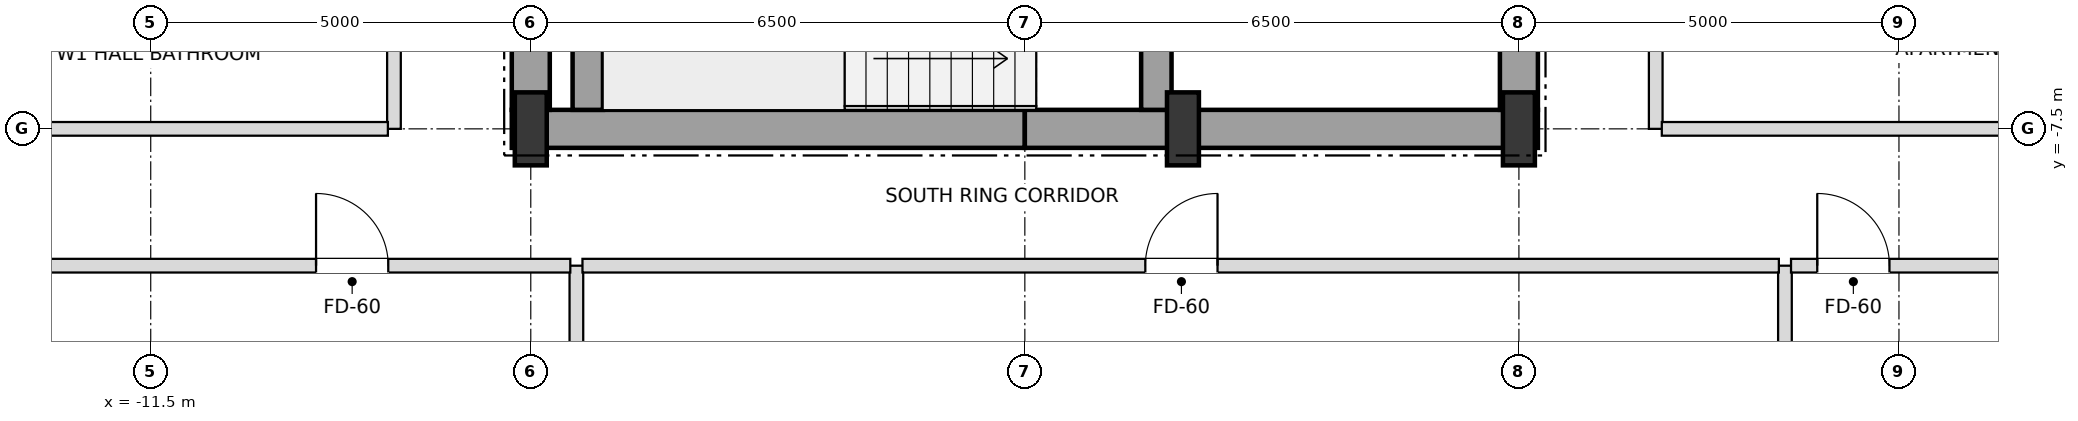
"""IFC4 building model, lengths in metres.
Left out: names, types, materials, properties, quantities, classifications, styles, units other than length and angle.
Written with IfcOpenShell. Run it as: python <this file> out.ifc"""

import sys

from ifc_helpers import new_model, si_unit, direction, frame, frame_2d, origin, origin_2d, place, context, subcontext, project, spatial, rectangle, i_section, extrude, element, fill, save


model = new_model("IFC4")
c1 = context("Model", 3, precision=1e-05, world=origin(), true_north=direction((0.0, 1.0)))
c2 = subcontext(c1, "Body", "Model", "MODEL_VIEW")
j1 = project(units=[si_unit("LENGTHUNIT", "METRE"), si_unit("PLANEANGLEUNIT", "RADIAN")], contexts=[c1])
p1 = place(None, origin())
s1 = spatial("IfcSite", under=j1, at=p1, CompositionType="ELEMENT")
p2 = place(p1, origin())
s2 = spatial("IfcBuilding", under=s1, at=p2, CompositionType="ELEMENT")
p3 = place(p2, frame((0.0, 0.0, 64.8)))
s3 = spatial("IfcBuildingStorey", under=s2, at=p3, CompositionType="ELEMENT", Elevation=64.8)
for number, where, z_axis, x_axis in (
    (1, (-6.5, -7.5, 0.0), (0.0, 0.0, 1.0), (1.0, 0.0, 0.0)),
    (2, (2.08, -7.5, 0.0), (0.0, 0.0, 1.0), (1.0, 0.0, 0.0)),
    (3, (6.5, -7.5, 0.0), (0.0, 0.0, 1.0), (1.0, 0.0, 0.0)),
):
    element("IfcColumn", number, at=place(p3, frame(where, z_axis=z_axis, x_axis=x_axis)), inside=s3, PredefinedType="COLUMN", context=c2, shape_type="SweptSolid", body=[
        extrude(i_section(OverallWidth=0.42, OverallDepth=0.96, WebThickness=0.022, FlangeThickness=0.034, at=origin_2d()), origin(), (0.0, 0.0, 1.0), 3.6),
    ])
for number, where, z_axis, x_axis in (
    (4, (-6.75, -7.5, 0.0), (0.0, 0.0, 1.0), (1.0, 0.0, 0.0)),
    (5, (0.0, -7.5, 0.0), (0.0, 0.0, 1.0), (1.0, 0.0, 0.0)),
):
    element("IfcWall", number, at=place(p3, frame(where, z_axis=z_axis, x_axis=x_axis)), inside=s3, PredefinedType="SHEAR", context=c2, shape_type="SweptSolid", body=[
        extrude(rectangle(XDim=6.75, YDim=0.5, at=frame_2d((3.375, 0.0))), origin(), (0.0, 0.0, 1.0), 3.38),
    ])
p4 = place(p3, frame((-6.5, -7.25, 0.0), z_axis=(0.0, 0.0, 1.0), x_axis=(0.0, 1.0, 0.0)))
e6 = element("IfcWall", 6, at=p4, inside=s3, PredefinedType="SHEAR", context=c2, shape_type="SweptSolid", body=[
    extrude(rectangle(XDim=3.55, YDim=0.5, at=frame_2d((1.775, 0.0))), origin(), (0.0, 0.0, 1.0), 3.38),
])
p5 = place(p3, frame((6.5, -7.25, 0.0), z_axis=(0.0, 0.0, 1.0), x_axis=(0.0, 1.0, 0.0)))
e7 = element("IfcWall", 7, at=p5, inside=s3, PredefinedType="SHEAR", context=c2, shape_type="SweptSolid", body=[
    extrude(rectangle(XDim=5.75, YDim=0.5, at=frame_2d((2.875, 0.0))), origin(), (0.0, 0.0, 1.0), 3.38),
])
p6 = place(p5, frame((0.85, 0.0, 0.0)))
e8 = element("IfcOpeningElement", 8, at=p6, cuts=e7, PredefinedType="OPENING", context=c2, shape_type="SweptSolid", body=[
    extrude(rectangle(XDim=1.05, YDim=2.15, at=frame_2d((0.525, 1.075))), frame((0.0, 0.26, 0.0), z_axis=(0.0, -1.0, 0.0), x_axis=(1.0, 0.0, 0.0)), (0.0, 0.0, 1.0), 0.52),
])
p7 = place(p3, frame((-5.75, -7.25, 0.0), z_axis=(0.0, 0.0, 1.0), x_axis=(0.0, 1.0, 0.0)))
e9 = element("IfcWall", 9, at=p7, inside=s3, PredefinedType="SHEAR", context=c2, shape_type="SweptSolid", body=[
    extrude(rectangle(XDim=2.9, YDim=0.4, at=frame_2d((1.45, 0.0))), origin(), (0.0, 0.0, 1.0), 3.38),
])
p8 = place(p3, frame((1.73, -7.25, 0.0), z_axis=(0.0, 0.0, 1.0), x_axis=(0.0, 1.0, 0.0)))
e10 = element("IfcWall", 10, at=p8, inside=s3, PredefinedType="SHEAR", context=c2, shape_type="SweptSolid", body=[
    extrude(rectangle(XDim=3.3, YDim=0.4, at=frame_2d((1.65, 0.0))), origin(), (0.0, 0.0, 1.0), 3.38),
])
p9 = place(p8, frame((0.9, 0.0, 0.0)))
e11 = element("IfcOpeningElement", 11, at=p9, cuts=e10, PredefinedType="OPENING", context=c2, shape_type="SweptSolid", body=[
    extrude(rectangle(XDim=1.05, YDim=2.15, at=frame_2d((0.525, 1.075))), frame((0.0, 0.21, 0.0), z_axis=(0.0, -1.0, 0.0), x_axis=(1.0, 0.0, 0.0)), (0.0, 0.0, 1.0), 0.42),
])
p10 = place(p3, frame((-8.3, -7.5, 0.0), z_axis=(0.0, 0.0, 1.0), x_axis=(0.0, 1.0, 0.0)))
e12 = element("IfcWall", 12, at=p10, inside=s3, PredefinedType="PARTITIONING", context=c2, shape_type="SweptSolid", body=[
    extrude(rectangle(XDim=15.0, YDim=0.18, at=frame_2d((7.5, 0.0))), origin(), (0.0, 0.0, 1.0), 3.38),
])
p11 = place(p10, frame((3.475, 0.0, 0.0)))
e13 = element("IfcOpeningElement", 13, at=p11, cuts=e12, PredefinedType="OPENING", context=c2, shape_type="SweptSolid", body=[
    extrude(rectangle(XDim=0.95, YDim=2.15, at=frame_2d((0.475, 1.075))), frame((0.0, 0.1, 0.0), z_axis=(0.0, -1.0, 0.0), x_axis=(1.0, 0.0, 0.0)), (0.0, 0.0, 1.0), 0.2),
])
p12 = place(p3, frame((-5.9, -24.9, 0.0), z_axis=(0.0, 0.0, 1.0), x_axis=(0.0, 1.0, 0.0)))
e14 = element("IfcWall", 14, at=p12, inside=s3, PredefinedType="PARTITIONING", context=c2, shape_type="SweptSolid", body=[
    extrude(rectangle(XDim=15.6, YDim=0.18, at=frame_2d((7.8, 0.0))), origin(), (0.0, 0.0, 1.0), 2.816),
])
p13 = place(p3, frame((8.3, -7.5, 0.0), z_axis=(0.0, 0.0, 1.0), x_axis=(0.0, 1.0, 0.0)))
e15 = element("IfcWall", 15, at=p13, inside=s3, PredefinedType="PARTITIONING", context=c2, shape_type="SweptSolid", body=[
    extrude(rectangle(XDim=15.0, YDim=0.18, at=frame_2d((7.5, 0.0))), origin(), (0.0, 0.0, 1.0), 3.38),
])
p14 = place(p13, frame((3.475, 0.0, 0.0)))
e16 = element("IfcOpeningElement", 16, at=p14, cuts=e15, PredefinedType="OPENING", context=c2, shape_type="SweptSolid", body=[
    extrude(rectangle(XDim=0.95, YDim=2.15, at=frame_2d((0.475, 1.075))), frame((0.0, 0.1, 0.0), z_axis=(0.0, -1.0, 0.0), x_axis=(1.0, 0.0, 0.0)), (0.0, 0.0, 1.0), 0.2),
])
p15 = place(p3, frame((10.0, -24.9, 0.0), z_axis=(0.0, 0.0, 1.0), x_axis=(0.0, 1.0, 0.0)))
e17 = element("IfcWall", 17, at=p15, inside=s3, PredefinedType="PARTITIONING", context=c2, shape_type="SweptSolid", body=[
    extrude(rectangle(XDim=15.6, YDim=0.18, at=frame_2d((7.8, 0.0))), origin(), (0.0, 0.0, 1.0), 2.816),
])
p16 = place(p3, frame((-18.4, -9.3, 0.0), z_axis=(0.0, 0.0, 1.0), x_axis=(1.0, 0.0, 0.0)))
e18 = element("IfcWall", 18, at=p16, inside=s3, PredefinedType="PARTITIONING", context=c2, shape_type="SweptSolid", body=[
    extrude(rectangle(XDim=12.42, YDim=0.18, at=frame_2d((6.21, 0.0))), origin(), (0.0, 0.0, 1.0), 2.816),
])
p17 = place(p16, frame((9.075, 0.0, 0.0)))
e19 = element("IfcOpeningElement", 19, at=p17, cuts=e18, PredefinedType="OPENING", context=c2, shape_type="SweptSolid", body=[
    extrude(rectangle(XDim=0.95, YDim=2.15, at=frame_2d((0.475, 1.075))), frame((0.0, 0.1, 0.0), z_axis=(0.0, -1.0, 0.0), x_axis=(1.0, 0.0, 0.0)), (0.0, 0.0, 1.0), 0.2),
])
p18 = place(p3, frame((-5.82, -9.3, 0.0), z_axis=(0.0, 0.0, 1.0), x_axis=(1.0, 0.0, 0.0)))
e20 = element("IfcWall", 20, at=p18, inside=s3, PredefinedType="PARTITIONING", context=c2, shape_type="SweptSolid", body=[
    extrude(rectangle(XDim=15.74, YDim=0.18, at=frame_2d((7.87, 0.0))), origin(), (0.0, 0.0, 1.0), 2.816),
])
p19 = place(p18, frame((7.405, 0.0, 0.0)))
e21 = element("IfcOpeningElement", 21, at=p19, cuts=e20, PredefinedType="OPENING", context=c2, shape_type="SweptSolid", body=[
    extrude(rectangle(XDim=0.95, YDim=2.15, at=frame_2d((0.475, 1.075))), frame((0.0, 0.1, 0.0), z_axis=(0.0, -1.0, 0.0), x_axis=(1.0, 0.0, 0.0)), (0.0, 0.0, 1.0), 0.2),
])
p20 = place(p3, frame((10.08, -9.3, 0.0), z_axis=(0.0, 0.0, 1.0), x_axis=(1.0, 0.0, 0.0)))
e22 = element("IfcWall", 22, at=p20, inside=s3, PredefinedType="PARTITIONING", context=c2, shape_type="SweptSolid", body=[
    extrude(rectangle(XDim=8.32, YDim=0.18, at=frame_2d((4.16, 0.0))), origin(), (0.0, 0.0, 1.0), 2.816),
])
p21 = place(p20, frame((0.345, 0.0, 0.0)))
e23 = element("IfcOpeningElement", 23, at=p21, cuts=e22, PredefinedType="OPENING", context=c2, shape_type="SweptSolid", body=[
    extrude(rectangle(XDim=0.95, YDim=2.15, at=frame_2d((0.475, 1.075))), frame((0.0, 0.1, 0.0), z_axis=(0.0, -1.0, 0.0), x_axis=(1.0, 0.0, 0.0)), (0.0, 0.0, 1.0), 0.2),
])
for number, where, z_axis, x_axis in (
    (24, (-16.02, -7.5, 0.0), (0.0, 0.0, 1.0), (1.0, 0.0, 0.0)),
    (25, (8.38, -7.5, 0.0), (0.0, 0.0, 1.0), (1.0, 0.0, 0.0)),
):
    element("IfcWall", number, at=place(p3, frame(where, z_axis=z_axis, x_axis=x_axis)), inside=s3, PredefinedType="PARTITIONING", context=c2, shape_type="SweptSolid", body=[
        extrude(rectangle(XDim=7.64, YDim=0.18, at=frame_2d((3.82, 0.0))), origin(), (0.0, 0.0, 1.0), 2.816),
    ])
p22 = place(p17, origin())
e26 = element("IfcDoor", 26, at=p22, inside=s3, OperationType="SINGLE_SWING_LEFT", PredefinedType="DOOR", context=c2, shape_type="SweptSolid", body=[
    extrude(rectangle(XDim=0.95, YDim=2.15, at=frame_2d((0.475, 1.075))), frame((0.0, 0.025, 0.0), z_axis=(0.0, -1.0, 0.0), x_axis=(1.0, 0.0, 0.0)), (0.0, 0.0, 1.0), 0.05),
])
fill(e19, e26)
p23 = place(p19, origin())
e27 = element("IfcDoor", 27, at=p23, inside=s3, OperationType="SINGLE_SWING_RIGHT", PredefinedType="DOOR", context=c2, shape_type="SweptSolid", body=[
    extrude(rectangle(XDim=0.95, YDim=2.15, at=frame_2d((0.475, 1.075))), frame((0.0, 0.025, 0.0), z_axis=(0.0, -1.0, 0.0), x_axis=(1.0, 0.0, 0.0)), (0.0, 0.0, 1.0), 0.05),
])
fill(e21, e27)
p24 = place(p21, origin())
e28 = element("IfcDoor", 28, at=p24, inside=s3, OperationType="SINGLE_SWING_LEFT", PredefinedType="DOOR", context=c2, shape_type="SweptSolid", body=[
    extrude(rectangle(XDim=0.95, YDim=2.15, at=frame_2d((0.475, 1.075))), frame((0.0, 0.025, 0.0), z_axis=(0.0, -1.0, 0.0), x_axis=(1.0, 0.0, 0.0)), (0.0, 0.0, 1.0), 0.05),
])
fill(e23, e28)
save(model, sys.argv[1])
